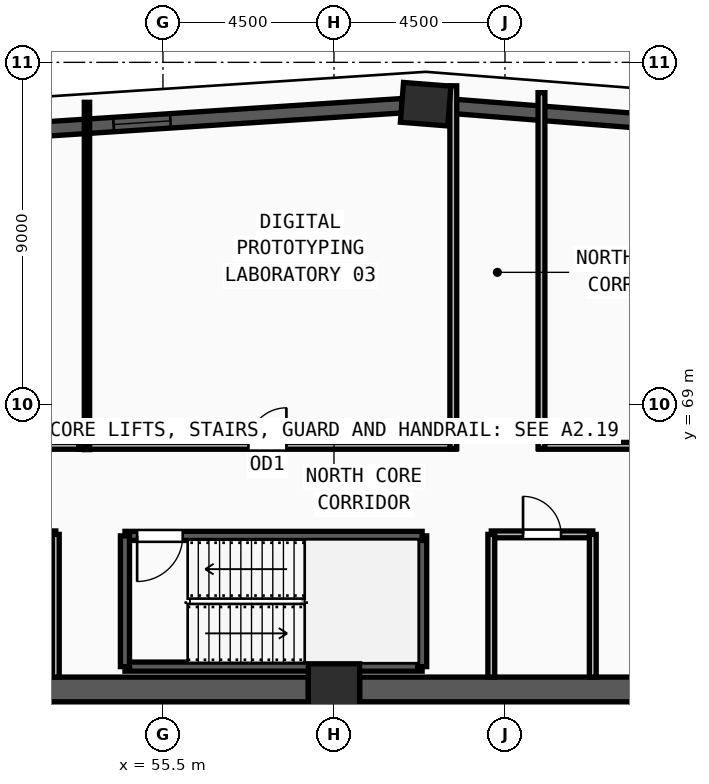
"""IFC4 building model, lengths in metres.
Left out: names, types, materials, properties, quantities, classifications, styles, units other than length and angle.
Written with IfcOpenShell. Run it as: python <this file> out.ifc"""

import sys

from ifc_helpers import new_model, si_unit, direction, frame, frame_2d, origin, origin_2d, place, context, subcontext, project, spatial, rectangle, extrude, source, transform, mapped, element, fill, save


model = new_model("IFC4")
c1 = context("Model", 3, precision=1e-05, world=origin(), true_north=direction((0.0, 1.0)))
c2 = subcontext(c1, "Body", "Model", "MODEL_VIEW")
j1 = project(units=[si_unit("LENGTHUNIT", "METRE"), si_unit("PLANEANGLEUNIT", "RADIAN")], contexts=[c1])
p1 = place(None, origin())
s1 = spatial("IfcSite", under=j1, at=p1, CompositionType="ELEMENT")
p2 = place(p1, origin())
s2 = spatial("IfcBuilding", under=s1, at=p2, CompositionType="ELEMENT")
p3 = place(p2, frame((0.0, 0.0, 270.0)))
s3 = spatial("IfcBuildingStorey", under=s2, at=p3, CompositionType="ELEMENT", Elevation=270.0)
m1 = source(origin(), c2, "Body", "SweptSolid", [
    extrude(rectangle(XDim=1.35, YDim=1.35, at=origin_2d()), origin(), (0.0, 0.0, 1.0), 3.75),
])
p4 = place(p3, frame((60.0, 61.5, 0.0), z_axis=(0.0, 0.0, 1.0), x_axis=(1.0, 0.0, 0.0)))
e1 = element("IfcColumn", 1, at=p4, inside=s3, PredefinedType="COLUMN", context=c2, shape_type="MappedRepresentation", body=[
    mapped(m1, transform((0.0, 0.0, 0.0), x_axis=(1.0, 0.0, 0.0), y_axis=(0.0, 1.0, 0.0), z_axis=(0.0, 0.0, 1.0), scale=1.0)),
])
m2 = source(origin(), c2, "Body", "SweptSolid", [
    extrude(rectangle(XDim=1.25, YDim=1.05, at=origin_2d()), origin(), (0.0, 0.0, 1.0), 3.75),
])
p5 = place(p3, frame((62.412, 76.899, 0.0), z_axis=(0.0, 0.0, 1.0), x_axis=(-0.996958278162, 0.077937100301, 0.0)))
e2 = element("IfcColumn", 2, at=p5, inside=s3, PredefinedType="COLUMN", context=c2, shape_type="MappedRepresentation", body=[
    mapped(m2, transform((0.0, 0.0, 0.0), x_axis=(1.0, 0.0, 0.0), y_axis=(0.0, 1.0, 0.0), z_axis=(0.0, 0.0, 1.0), scale=1.0)),
])
p6 = place(p3, frame((85.597, 75.088, 0.0), z_axis=(0.0, 0.0, 1.0), x_axis=(-0.996963017865, 0.077876447083, 0.0)))
e3 = element("IfcWall", 3, at=p6, inside=s3, PredefinedType="SOLIDWALL", context=c2, shape_type="SweptSolid", body=[
    extrude(rectangle(XDim=22.641, YDim=0.38, at=frame_2d((11.32, 0.0))), origin(), (0.0, 0.0, 1.0), 3.57),
])
m3 = source(origin(), c2, "Body", "SweptSolid", [
    extrude(rectangle(XDim=1.5, YDim=1.9, at=frame_2d((0.75, 0.95))), frame((0.0, 0.2, 0.0), z_axis=(0.0, -1.0, 0.0), x_axis=(1.0, 0.0, 0.0)), (0.0, 0.0, 1.0), 0.4),
])
p7 = place(p6, frame((4.91, 0.0, 0.55)))
e4 = element("IfcOpeningElement", 4, at=p7, cuts=e3, PredefinedType="OPENING", context=c2, shape_type="MappedRepresentation", body=[
    mapped(m3, transform((0.0, 0.0, 0.0), x_axis=(1.0, 0.0, 0.0), y_axis=(0.0, 1.0, 0.0), z_axis=(0.0, 0.0, 1.0), scale=1.0)),
])
p8 = place(p6, frame((10.57, 0.0, 0.55)))
e5 = element("IfcOpeningElement", 5, at=p8, cuts=e3, PredefinedType="OPENING", context=c2, shape_type="MappedRepresentation", body=[
    mapped(m3, transform((0.0, 0.0, 0.0), x_axis=(1.0, 0.0, 0.0), y_axis=(0.0, 1.0, 0.0), z_axis=(0.0, 0.0, 1.0), scale=1.0)),
])
p9 = place(p6, frame((16.231, 0.0, 0.55)))
e6 = element("IfcOpeningElement", 6, at=p9, cuts=e3, PredefinedType="OPENING", context=c2, shape_type="MappedRepresentation", body=[
    mapped(m3, transform((0.0, 0.0, 0.0), x_axis=(1.0, 0.0, 0.0), y_axis=(0.0, 1.0, 0.0), z_axis=(0.0, 0.0, 1.0), scale=1.0)),
])
p10 = place(p3, frame((61.798, 76.859, 0.0), z_axis=(0.0, 0.0, 1.0), x_axis=(-0.997879704208, -0.065085297335, 0.0)))
e7 = element("IfcWall", 7, at=p10, inside=s3, PredefinedType="SOLIDWALL", context=c2, shape_type="SweptSolid", body=[
    extrude(rectangle(XDim=27.454, YDim=0.38, at=frame_2d((13.727, 0.0))), origin(), (0.0, 0.0, 1.0), 3.57),
])
p11 = place(p10, frame((6.114, 0.0, 0.55)))
e8 = element("IfcOpeningElement", 8, at=p11, cuts=e7, PredefinedType="OPENING", context=c2, shape_type="MappedRepresentation", body=[
    mapped(m3, transform((0.0, 0.0, 0.0), x_axis=(1.0, 0.0, 0.0), y_axis=(0.0, 1.0, 0.0), z_axis=(0.0, 0.0, 1.0), scale=1.0)),
])
p12 = place(p10, frame((12.977, 0.0, 0.55)))
e9 = element("IfcOpeningElement", 9, at=p12, cuts=e7, PredefinedType="OPENING", context=c2, shape_type="MappedRepresentation", body=[
    mapped(m3, transform((0.0, 0.0, 0.0), x_axis=(1.0, 0.0, 0.0), y_axis=(0.0, 1.0, 0.0), z_axis=(0.0, 0.0, 1.0), scale=1.0)),
])
p13 = place(p10, frame((19.841, 0.0, 0.55)))
e10 = element("IfcOpeningElement", 10, at=p13, cuts=e7, PredefinedType="OPENING", context=c2, shape_type="MappedRepresentation", body=[
    mapped(m3, transform((0.0, 0.0, 0.0), x_axis=(1.0, 0.0, 0.0), y_axis=(0.0, 1.0, 0.0), z_axis=(0.0, 0.0, 1.0), scale=1.0)),
])
for number, where, z_axis, x_axis in (
    (11, (51.675, 61.5, 0.0), (0.0, 0.0, 1.0), (1.0, 0.0, 0.0)),
    (12, (60.675, 61.5, 0.0), (0.0, 0.0, 1.0), (1.0, 0.0, 0.0)),
):
    element("IfcWall", number, at=place(p3, frame(where, z_axis=z_axis, x_axis=x_axis)), inside=s3, PredefinedType="SHEAR", context=c2, shape_type="SweptSolid", body=[
        extrude(rectangle(XDim=7.65, YDim=0.65, at=frame_2d((3.825, 0.0))), origin(), (0.0, 0.0, 1.0), 3.57),
    ])
p14 = place(p3, frame((54.5, 62.1, 0.0), z_axis=(0.0, 0.0, 1.0), x_axis=(1.0, 0.0, 0.0)))
e13 = element("IfcWall", 13, at=p14, inside=s3, PredefinedType="SOLIDWALL", context=c2, shape_type="SweptSolid", body=[
    extrude(rectangle(XDim=7.82, YDim=0.24, at=frame_2d((3.91, 0.0))), origin(), (0.0, 0.0, 1.0), 3.57),
])
p15 = place(p3, frame((62.32, 62.1, 0.0), z_axis=(0.0, 0.0, 1.0), x_axis=(0.0, 1.0, 0.0)))
e14 = element("IfcWall", 14, at=p15, inside=s3, PredefinedType="SOLIDWALL", context=c2, shape_type="SweptSolid", body=[
    extrude(rectangle(XDim=3.44, YDim=0.24, at=frame_2d((1.72, 0.0))), origin(), (0.0, 0.0, 1.0), 3.57),
])
p16 = place(p3, frame((62.32, 65.54, 0.0), z_axis=(0.0, 0.0, 1.0), x_axis=(-1.0, 0.0, 0.0)))
e15 = element("IfcWall", 15, at=p16, inside=s3, PredefinedType="SOLIDWALL", context=c2, shape_type="SweptSolid", body=[
    extrude(rectangle(XDim=7.82, YDim=0.24, at=frame_2d((3.91, 0.0))), origin(), (0.0, 0.0, 1.0), 3.57),
])
m4 = source(origin(), c2, "Body", "SweptSolid", [
    extrude(rectangle(XDim=1.2, YDim=2.2, at=frame_2d((0.6, 1.1))), frame((0.0, 0.13, 0.0), z_axis=(0.0, -1.0, 0.0), x_axis=(1.0, 0.0, 0.0)), (0.0, 0.0, 1.0), 0.26),
])
p17 = place(p16, frame((6.3, 0.0, 0.0)))
e16 = element("IfcOpeningElement", 16, at=p17, cuts=e15, PredefinedType="OPENING", context=c2, shape_type="MappedRepresentation", body=[
    mapped(m4, transform((0.0, 0.0, 0.0), x_axis=(1.0, 0.0, 0.0), y_axis=(0.0, 1.0, 0.0), z_axis=(0.0, 0.0, 1.0), scale=1.0)),
])
p18 = place(p3, frame((54.5, 65.54, 0.0), z_axis=(0.0, 0.0, 1.0), x_axis=(0.0, -1.0, 0.0)))
e17 = element("IfcWall", 17, at=p18, inside=s3, PredefinedType="SOLIDWALL", context=c2, shape_type="SweptSolid", body=[
    extrude(rectangle(XDim=3.44, YDim=0.24, at=frame_2d((1.72, 0.0))), origin(), (0.0, 0.0, 1.0), 3.57),
])
p19 = place(p3, frame((50.54, 65.58, 0.0), z_axis=(0.0, 0.0, 1.0), x_axis=(1.0, 0.0, 0.0)))
e18 = element("IfcWall", 18, at=p19, inside=s3, PredefinedType="PARTITIONING", context=c2, shape_type="SweptSolid", body=[
    extrude(rectangle(XDim=2.14, YDim=0.18, at=frame_2d((1.07, 0.0))), origin(), (0.0, 0.0, 1.0), 3.57),
])
m5 = source(origin(), c2, "Body", "SweptSolid", [
    extrude(rectangle(XDim=0.85, YDim=2.1, at=frame_2d((0.425, 1.05))), frame((0.0, 0.1, 0.0), z_axis=(0.0, -1.0, 0.0), x_axis=(1.0, 0.0, 0.0)), (0.0, 0.0, 1.0), 0.2),
])
p20 = place(p19, frame((0.645, 0.0, 0.0)))
e19 = element("IfcOpeningElement", 19, at=p20, cuts=e18, PredefinedType="OPENING", context=c2, shape_type="MappedRepresentation", body=[
    mapped(m5, transform((0.0, 0.0, 0.0), x_axis=(1.0, 0.0, 0.0), y_axis=(0.0, 1.0, 0.0), z_axis=(0.0, 0.0, 1.0), scale=1.0)),
])
p21 = place(p3, frame((64.14, 65.58, 0.0), z_axis=(0.0, 0.0, 1.0), x_axis=(1.0, 0.0, 0.0)))
e20 = element("IfcWall", 20, at=p21, inside=s3, PredefinedType="PARTITIONING", context=c2, shape_type="SweptSolid", body=[
    extrude(rectangle(XDim=2.67, YDim=0.18, at=frame_2d((1.335, 0.0))), origin(), (0.0, 0.0, 1.0), 3.57),
])
m6 = source(origin(), c2, "Body", "SweptSolid", [
    extrude(rectangle(XDim=1.0, YDim=2.2, at=frame_2d((0.5, 1.1))), frame((0.0, 0.1, 0.0), z_axis=(0.0, -1.0, 0.0), x_axis=(1.0, 0.0, 0.0)), (0.0, 0.0, 1.0), 0.2),
])
p22 = place(p21, frame((0.835, 0.0, 0.0)))
e21 = element("IfcOpeningElement", 21, at=p22, cuts=e20, PredefinedType="OPENING", context=c2, shape_type="MappedRepresentation", body=[
    mapped(m6, transform((0.0, 0.0, 0.0), x_axis=(1.0, 0.0, 0.0), y_axis=(0.0, 1.0, 0.0), z_axis=(0.0, 0.0, 1.0), scale=1.0)),
])
p23 = place(p3, frame((65.39, 67.91, 0.0), z_axis=(0.0, 0.0, 1.0), x_axis=(1.0, 0.0, 0.0)))
e22 = element("IfcWall", 22, at=p23, inside=s3, PredefinedType="PARTITIONING", context=c2, shape_type="SweptSolid", body=[
    extrude(rectangle(XDim=10.24, YDim=0.18, at=frame_2d((5.12, 0.0))), origin(), (0.0, 0.0, 1.0), 3.205),
])
m7 = source(origin(), c2, "Body", "SweptSolid", [
    extrude(rectangle(XDim=1.5, YDim=2.2, at=frame_2d((0.75, 1.1))), frame((0.0, 0.1, 0.0), z_axis=(0.0, -1.0, 0.0), x_axis=(1.0, 0.0, 0.0)), (0.0, 0.0, 1.0), 0.2),
])
p24 = place(p23, frame((4.37, 0.0, 0.0)))
e23 = element("IfcOpeningElement", 23, at=p24, cuts=e22, PredefinedType="OPENING", context=c2, shape_type="MappedRepresentation", body=[
    mapped(m7, transform((0.0, 0.0, 0.0), x_axis=(1.0, 0.0, 0.0), y_axis=(0.0, 1.0, 0.0), z_axis=(0.0, 0.0, 1.0), scale=1.0)),
])
p25 = place(p3, frame((53.285, 67.91, 0.0), z_axis=(0.0, 0.0, 1.0), x_axis=(1.0, 0.0, 0.0)))
e24 = element("IfcWall", 24, at=p25, inside=s3, PredefinedType="PARTITIONING", context=c2, shape_type="SweptSolid", body=[
    extrude(rectangle(XDim=9.925, YDim=0.18, at=frame_2d((4.962, 0.0))), origin(), (0.0, 0.0, 1.0), 3.205),
])
p26 = place(p25, frame((4.463, 0.0, 0.0)))
e25 = element("IfcOpeningElement", 25, at=p26, cuts=e24, PredefinedType="OPENING", context=c2, shape_type="MappedRepresentation", body=[
    mapped(m6, transform((0.0, 0.0, 0.0), x_axis=(1.0, 0.0, 0.0), y_axis=(0.0, 1.0, 0.0), z_axis=(0.0, 0.0, 1.0), scale=1.0)),
])
p27 = place(p3, frame((44.37, 67.91, 0.0), z_axis=(0.0, 0.0, 1.0), x_axis=(1.0, 0.0, 0.0)))
e26 = element("IfcWall", 26, at=p27, inside=s3, PredefinedType="PARTITIONING", context=c2, shape_type="SweptSolid", body=[
    extrude(rectangle(XDim=8.915, YDim=0.18, at=frame_2d((4.458, 0.0))), origin(), (0.0, 0.0, 1.0), 3.205),
])
p28 = place(p27, frame((3.707, 0.0, 0.0)))
e27 = element("IfcOpeningElement", 27, at=p28, cuts=e26, PredefinedType="OPENING", context=c2, shape_type="MappedRepresentation", body=[
    mapped(m7, transform((0.0, 0.0, 0.0), x_axis=(1.0, 0.0, 0.0), y_axis=(0.0, 1.0, 0.0), z_axis=(0.0, 0.0, 1.0), scale=1.0)),
])
for number, where, z_axis, x_axis in (
    (28, (52.68, 61.825, 0.0), (0.0, 0.0, 1.0), (0.0, 1.0, 0.0)),
    (29, (64.14, 61.825, 0.0), (0.0, 0.0, 1.0), (0.0, 1.0, 0.0)),
    (30, (66.81, 61.825, 0.0), (0.0, 0.0, 1.0), (0.0, 1.0, 0.0)),
):
    element("IfcWall", number, at=place(p3, frame(where, z_axis=z_axis, x_axis=x_axis)), inside=s3, PredefinedType="PARTITIONING", context=c2, shape_type="SweptSolid", body=[
        extrude(rectangle(XDim=3.755, YDim=0.18, at=frame_2d((1.877, 0.0))), origin(), (0.0, 0.0, 1.0), 3.57),
    ])
p29 = place(p3, frame((65.46, 77.202, 0.0), z_axis=(0.0, 0.0, 1.0), x_axis=(0.0, -1.0, 0.0)))
e31 = element("IfcWall", 31, at=p29, inside=s3, PredefinedType="PARTITIONING", context=c2, shape_type="SweptSolid", body=[
    extrude(rectangle(XDim=9.362, YDim=0.18, at=frame_2d((4.681, 0.0))), origin(), (0.0, 0.0, 1.0), 3.57),
])
p30 = place(p3, frame((63.14, 67.84, 0.0), z_axis=(0.0, 0.0, 1.0), x_axis=(0.0, 1.0, 0.0)))
e32 = element("IfcWall", 32, at=p30, inside=s3, PredefinedType="PARTITIONING", context=c2, shape_type="SweptSolid", body=[
    extrude(rectangle(XDim=9.543, YDim=0.18, at=frame_2d((4.771, 0.0))), origin(), (0.0, 0.0, 1.0), 3.57),
])
p31 = place(p3, frame((53.5, 67.81, 0.0), z_axis=(0.0, 0.0, 1.0), x_axis=(0.0, 1.0, 0.0)))
e33 = element("IfcWall", 33, at=p31, inside=s3, PredefinedType="PARTITIONING", context=c2, shape_type="SweptSolid", body=[
    extrude(rectangle(XDim=9.139, YDim=0.14, at=frame_2d((4.569, 0.0))), origin(), (0.0, 0.0, 1.0), 3.57),
])
m8 = source(origin(), c2, "Body", "SweptSolid", [
    extrude(rectangle(XDim=1.5, YDim=1.9, at=frame_2d((0.75, 0.95))), frame((0.0, 0.03, 0.0), z_axis=(0.0, -1.0, 0.0), x_axis=(1.0, 0.0, 0.0)), (0.0, 0.0, 1.0), 0.06),
])
p32 = place(p11, origin())
e34 = element("IfcWindow", 34, at=p32, inside=s3, PartitioningType="DOUBLE_PANEL_VERTICAL", PredefinedType="WINDOW", context=c2, shape_type="MappedRepresentation", body=[
    mapped(m8, transform((0.0, 0.0, 0.0), x_axis=(1.0, 0.0, 0.0), y_axis=(0.0, 1.0, 0.0), z_axis=(0.0, 0.0, 1.0), scale=1.0)),
])
fill(e8, e34)
m9 = source(origin(), c2, "Body", "SweptSolid", [
    extrude(rectangle(XDim=1.2, YDim=2.2, at=frame_2d((0.6, 1.1))), frame((0.0, 0.025, 0.0), z_axis=(0.0, -1.0, 0.0), x_axis=(1.0, 0.0, 0.0)), (0.0, 0.0, 1.0), 0.05),
])
p33 = place(p17, origin())
e35 = element("IfcDoor", 35, at=p33, inside=s3, OperationType="SINGLE_SWING_RIGHT", PredefinedType="DOOR", context=c2, shape_type="MappedRepresentation", body=[
    mapped(m9, transform((0.0, 0.0, 0.0), x_axis=(1.0, 0.0, 0.0), y_axis=(0.0, 1.0, 0.0), z_axis=(0.0, 0.0, 1.0), scale=1.0)),
])
fill(e16, e35)
m10 = source(origin(), c2, "Body", "SweptSolid", [
    extrude(rectangle(XDim=1.0, YDim=2.2, at=frame_2d((0.5, 1.1))), frame((0.0, 0.025, 0.0), z_axis=(0.0, -1.0, 0.0), x_axis=(1.0, 0.0, 0.0)), (0.0, 0.0, 1.0), 0.05),
])
p34 = place(p22, origin())
e36 = element("IfcDoor", 36, at=p34, inside=s3, OperationType="SINGLE_SWING_LEFT", PredefinedType="DOOR", context=c2, shape_type="MappedRepresentation", body=[
    mapped(m10, transform((0.0, 0.0, 0.0), x_axis=(1.0, 0.0, 0.0), y_axis=(0.0, 1.0, 0.0), z_axis=(0.0, 0.0, 1.0), scale=1.0)),
])
fill(e21, e36)
p35 = place(p26, origin())
e37 = element("IfcDoor", 37, at=p35, inside=s3, OperationType="SINGLE_SWING_RIGHT", PredefinedType="DOOR", context=c2, shape_type="MappedRepresentation", body=[
    mapped(m10, transform((0.0, 0.0, 0.0), x_axis=(1.0, 0.0, 0.0), y_axis=(0.0, 1.0, 0.0), z_axis=(0.0, 0.0, 1.0), scale=1.0)),
])
fill(e25, e37)
save(model, sys.argv[1])
